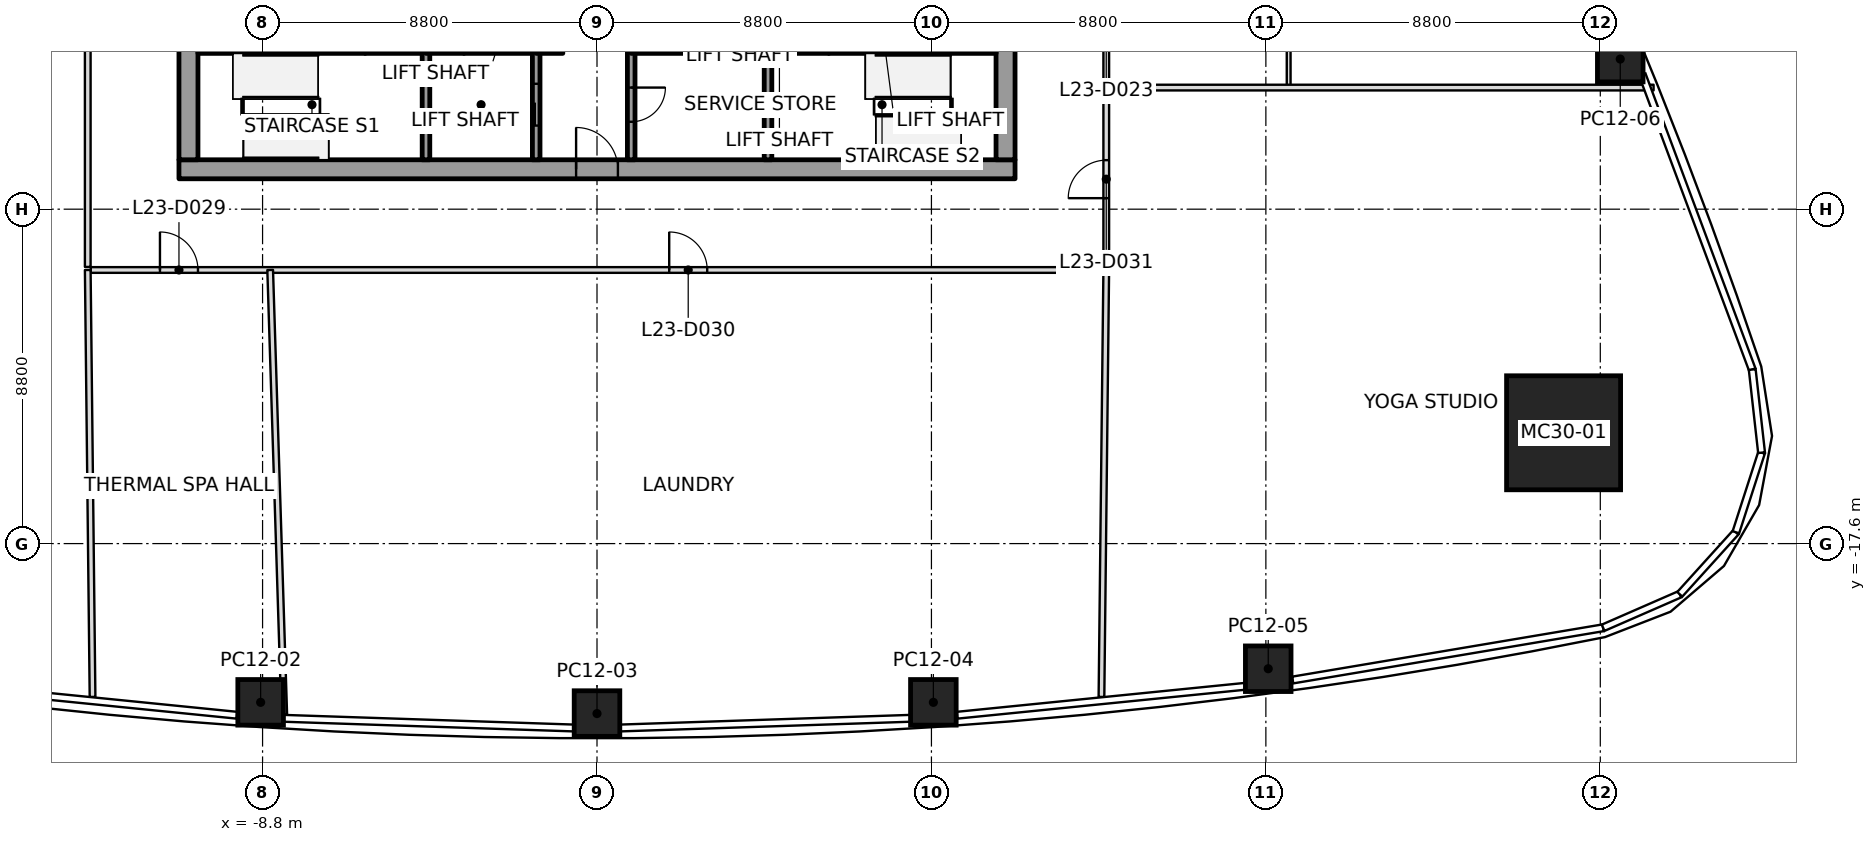
"""IFC4 building model, lengths in metres.
Left out: names, types, materials, properties, quantities, classifications, styles, units other than length and angle.
Written with IfcOpenShell. Run it as: python <this file> out.ifc"""

import sys

from ifc_helpers import new_model, si_unit, direction, frame, frame_2d, origin, origin_2d, place, context, subcontext, project, spatial, rectangle, extrude, clip, halfspace, element, fill, save


model = new_model("IFC4")
c1 = context("Model", 3, precision=1e-05, world=origin(), true_north=direction((0.0, 1.0)))
c2 = subcontext(c1, "Body", "Model", "MODEL_VIEW")
j1 = project(units=[si_unit("LENGTHUNIT", "METRE"), si_unit("PLANEANGLEUNIT", "RADIAN")], contexts=[c1])
p1 = place(None, origin())
s1 = spatial("IfcSite", under=j1, at=p1, CompositionType="ELEMENT")
p2 = place(p1, origin())
s2 = spatial("IfcBuilding", under=s1, at=p2, CompositionType="ELEMENT")
p3 = place(p2, frame((0.0, 0.0, 107.2)))
s3 = spatial("IfcBuildingStorey", under=s2, at=p3, CompositionType="ELEMENT", Elevation=107.2)
p4 = place(p3, frame((25.434, -14.684, 0.0), z_axis=(-0.020880956331, 0.012022368797, 0.999709682013), x_axis=(0.999781969063, 0.000251093304, 0.020879446579)))
e1 = element("IfcColumn", 1, at=p4, inside=s3, PredefinedType="COLUMN", context=c2, shape_type="SweptSolid", body=[
    clip(clip(extrude(rectangle(XDim=3.0, YDim=3.0, at=origin_2d()), origin(), (0.0, 0.0, 1.0), 5.402), halfspace(frame((0.0, 0.0, 0.012)), True)), halfspace(frame((0.0, 0.0, 5.399)), False)),
])
p5 = place(p3, frame((-8.851, -21.778, 0.0), z_axis=(0.00655508488, 0.008272969194, 0.99994429287), x_axis=(-0.997755324647, 0.066696663448, 0.005988925027)))
e2 = element("IfcColumn", 2, at=p5, inside=s3, PredefinedType="COLUMN", context=c2, shape_type="SweptSolid", body=[
    clip(clip(extrude(rectangle(XDim=1.2, YDim=1.2, at=origin_2d()), origin(), (0.0, 0.0, 1.0), 5.4), halfspace(frame((0.0, 0.0, 0.002)), True)), halfspace(frame((0.0, 0.0, 5.397)), False)),
])
p6 = place(p3, frame((0.0, -22.073, 0.0), z_axis=(0.0, 0.008499173095, 0.999963881376), x_axis=(1.0, 0.0, 0.0)))
e3 = element("IfcColumn", 3, at=p6, inside=s3, PredefinedType="COLUMN", context=c2, shape_type="SweptSolid", body=[
    clip(clip(extrude(rectangle(XDim=1.2, YDim=1.2, at=origin_2d()), origin(), (0.0, 0.0, 1.0), 5.4), halfspace(frame((0.0, 0.0, 0.001)), True)), halfspace(frame((0.0, 0.0, 5.397)), False)),
])
p7 = place(p3, frame((8.851, -21.778, 0.0), z_axis=(-0.00655508488, 0.008272969194, 0.99994429287), x_axis=(0.997755324647, 0.066696663448, 0.005988925027)))
e4 = element("IfcColumn", 4, at=p7, inside=s3, PredefinedType="COLUMN", context=c2, shape_type="SweptSolid", body=[
    clip(clip(extrude(rectangle(XDim=1.2, YDim=1.2, at=origin_2d()), origin(), (0.0, 0.0, 1.0), 5.4), halfspace(frame((0.0, 0.0, 0.002)), True)), halfspace(frame((0.0, 0.0, 5.397)), False)),
])
p8 = place(p3, frame((17.662, -20.893, 0.0), z_axis=(-0.013154574087, 0.007775212175, 0.999883244812), x_axis=(0.991031175757, 0.133090691637, 0.012003186093)))
e5 = element("IfcColumn", 5, at=p8, inside=s3, PredefinedType="COLUMN", context=c2, shape_type="SweptSolid", body=[
    clip(clip(extrude(rectangle(XDim=1.2, YDim=1.2, at=origin_2d()), origin(), (0.0, 0.0, 1.0), 5.401), halfspace(frame((0.0, 0.0, 0.003)), True)), halfspace(frame((0.0, 0.0, 5.397)), False)),
])
p9 = place(p3, frame((26.925, -4.849, 0.0), z_axis=(-0.01329019196, 0.007503985937, 0.999883523713), x_axis=(-0.380349266777, 0.924765125623, -0.011995736484)))
e6 = element("IfcColumn", 6, at=p9, inside=s3, PredefinedType="COLUMN", context=c2, shape_type="SweptSolid", body=[
    clip(clip(extrude(rectangle(XDim=1.2, YDim=1.2, at=origin_2d()), origin(), (0.0, 0.0, 1.0), 5.401), halfspace(frame((0.0, 0.0, 0.003)), True)), halfspace(frame((0.0, 0.0, 5.397)), False)),
])
p10 = place(p3, frame((-11.0, -7.75, 0.0), z_axis=(0.0, 0.0, 1.0), x_axis=(1.0, 0.0, 0.0)))
e7 = element("IfcWall", 7, at=p10, inside=s3, PredefinedType="SHEAR", context=c2, shape_type="SweptSolid", body=[
    extrude(rectangle(XDim=22.0, YDim=0.5, at=frame_2d((11.0, 0.0))), origin(), (0.0, 0.0, 1.0), 5.4),
])
p11 = place(p10, frame((10.45, 0.0, 0.0)))
e8 = element("IfcOpeningElement", 8, at=p11, cuts=e7, PredefinedType="OPENING", context=c2, shape_type="SweptSolid", body=[
    extrude(rectangle(XDim=1.1, YDim=2.1, at=frame_2d((0.55, 1.05))), frame((0.0, 0.25, 0.0), z_axis=(0.0, -1.0, 0.0), x_axis=(1.0, 0.0, 0.0)), (0.0, 0.0, 1.0), 0.5),
])
p12 = place(p3, frame((-10.75, -7.5, 0.0), z_axis=(0.0, 0.0, 1.0), x_axis=(0.0, 1.0, 0.0)))
e9 = element("IfcWall", 9, at=p12, inside=s3, PredefinedType="SHEAR", context=c2, shape_type="SweptSolid", body=[
    extrude(rectangle(XDim=15.0, YDim=0.5, at=frame_2d((7.5, 0.0))), origin(), (0.0, 0.0, 1.0), 5.4),
])
p13 = place(p12, frame((6.6, 0.0, 0.0)))
e10 = element("IfcOpeningElement", 10, at=p13, cuts=e9, PredefinedType="OPENING", context=c2, shape_type="SweptSolid", body=[
    extrude(rectangle(XDim=1.8, YDim=2.1, at=frame_2d((0.9, 1.05))), frame((0.0, 0.25, 0.0), z_axis=(0.0, -1.0, 0.0), x_axis=(1.0, 0.0, 0.0)), (0.0, 0.0, 1.0), 0.5),
])
p14 = place(p3, frame((10.75, -7.5, 0.0), z_axis=(0.0, 0.0, 1.0), x_axis=(0.0, 1.0, 0.0)))
e11 = element("IfcWall", 11, at=p14, inside=s3, PredefinedType="SHEAR", context=c2, shape_type="SweptSolid", body=[
    extrude(rectangle(XDim=15.0, YDim=0.5, at=frame_2d((7.5, 0.0))), origin(), (0.0, 0.0, 1.0), 5.4),
])
p15 = place(p14, frame((6.6, 0.0, 0.0)))
e12 = element("IfcOpeningElement", 12, at=p15, cuts=e11, PredefinedType="OPENING", context=c2, shape_type="SweptSolid", body=[
    extrude(rectangle(XDim=1.8, YDim=2.1, at=frame_2d((0.9, 1.05))), frame((0.0, 0.25, 0.0), z_axis=(0.0, -1.0, 0.0), x_axis=(1.0, 0.0, 0.0)), (0.0, 0.0, 1.0), 0.5),
])
p16 = place(p3, frame((-10.5, -4.6, 0.0), z_axis=(0.0, 0.0, 1.0), x_axis=(1.0, 0.0, 0.0)))
e13 = element("IfcWall", 13, at=p16, inside=s3, PredefinedType="SOLIDWALL", context=c2, shape_type="SweptSolid", body=[
    extrude(rectangle(XDim=1.8, YDim=0.2, at=frame_2d((0.9, 0.0))), origin(), (0.0, 0.0, 1.0), 5.25),
])
p17 = place(p16, frame((0.1, 0.0, 0.0)))
e14 = element("IfcOpeningElement", 14, at=p17, cuts=e13, PredefinedType="OPENING", context=c2, shape_type="SweptSolid", body=[
    extrude(rectangle(XDim=1.0, YDim=2.1, at=frame_2d((0.5, 1.05))), frame((0.0, 0.1, 0.0), z_axis=(0.0, -1.0, 0.0), x_axis=(1.0, 0.0, 0.0)), (0.0, 0.0, 1.0), 0.2),
])
p18 = place(p3, frame((-8.7, -4.6, 0.0), z_axis=(0.0, 0.0, 1.0), x_axis=(1.0, 0.0, 0.0)))
e15 = element("IfcWall", 15, at=p18, inside=s3, PredefinedType="SOLIDWALL", context=c2, shape_type="SweptSolid", body=[
    extrude(rectangle(XDim=2.6, YDim=0.2, at=frame_2d((1.3, 0.0))), origin(), (0.0, 0.0, 1.0), 5.25),
])
p19 = place(p3, frame((-6.1, -4.6, 0.0), z_axis=(0.0, 0.0, 1.0), x_axis=(1.0, 0.0, 0.0)))
e16 = element("IfcWall", 16, at=p19, inside=s3, PredefinedType="SOLIDWALL", context=c2, shape_type="SweptSolid", body=[
    extrude(rectangle(XDim=1.6, YDim=0.2, at=frame_2d((0.8, 0.0))), origin(), (0.0, 0.0, 1.0), 5.25),
])
p20 = place(p3, frame((-4.5, -4.6, 0.0), z_axis=(0.0, 0.0, 1.0), x_axis=(0.0, -1.0, 0.0)))
e17 = element("IfcWall", 17, at=p20, inside=s3, PredefinedType="SOLIDWALL", context=c2, shape_type="SweptSolid", body=[
    extrude(rectangle(XDim=2.9, YDim=0.2, at=frame_2d((1.45, 0.0))), origin(), (0.0, 0.0, 1.0), 5.25),
])
p21 = place(p3, frame((-4.5, -4.6, 0.0), z_axis=(0.0, 0.0, 1.0), x_axis=(1.0, 0.0, 0.0)))
e18 = element("IfcWall", 18, at=p21, inside=s3, PredefinedType="SOLIDWALL", context=c2, shape_type="SweptSolid", body=[
    extrude(rectangle(XDim=1.0, YDim=0.2, at=frame_2d((0.5, 0.0))), origin(), (0.0, 0.0, 1.0), 5.25),
])
p22 = place(p3, frame((-3.5, -4.6, 0.0), z_axis=(0.0, 0.0, 1.0), x_axis=(1.0, 0.0, 0.0)))
e19 = element("IfcWall", 19, at=p22, inside=s3, PredefinedType="SOLIDWALL", context=c2, shape_type="SweptSolid", body=[
    extrude(rectangle(XDim=1.9, YDim=0.2, at=frame_2d((0.95, 0.0))), origin(), (0.0, 0.0, 1.0), 5.25),
])
p23 = place(p3, frame((-1.6, -7.5, 0.0), z_axis=(0.0, 0.0, 1.0), x_axis=(0.0, 1.0, 0.0)))
e20 = element("IfcWall", 20, at=p23, inside=s3, PredefinedType="SOLIDWALL", context=c2, shape_type="SweptSolid", body=[
    extrude(rectangle(XDim=2.9, YDim=0.2, at=frame_2d((1.45, 0.0))), origin(), (0.0, 0.0, 1.0), 5.25),
])
p24 = place(p23, frame((0.9, 0.0, 0.0)))
e21 = element("IfcOpeningElement", 21, at=p24, cuts=e20, PredefinedType="OPENING", context=c2, shape_type="SweptSolid", body=[
    extrude(rectangle(XDim=1.1, YDim=2.1, at=frame_2d((0.55, 1.05))), frame((0.0, 0.1, 0.0), z_axis=(0.0, -1.0, 0.0), x_axis=(1.0, 0.0, 0.0)), (0.0, 0.0, 1.0), 0.2),
])
p25 = place(p3, frame((-1.6, -4.6, 0.0), z_axis=(0.0, 0.0, 1.0), x_axis=(1.0, 0.0, 0.0)))
e22 = element("IfcWall", 22, at=p25, inside=s3, PredefinedType="SOLIDWALL", context=c2, shape_type="SweptSolid", body=[
    extrude(rectangle(XDim=0.7, YDim=0.2, at=frame_2d((0.35, 0.0))), origin(), (0.0, 0.0, 1.0), 5.25),
])
p26 = place(p3, frame((0.9, -4.6, 0.0), z_axis=(0.0, 0.0, 1.0), x_axis=(0.0, -1.0, 0.0)))
e23 = element("IfcWall", 23, at=p26, inside=s3, PredefinedType="SOLIDWALL", context=c2, shape_type="SweptSolid", body=[
    extrude(rectangle(XDim=2.9, YDim=0.2, at=frame_2d((1.45, 0.0))), origin(), (0.0, 0.0, 1.0), 5.25),
])
p27 = place(p26, frame((1.0, 0.0, 0.0)))
e24 = element("IfcOpeningElement", 24, at=p27, cuts=e23, PredefinedType="OPENING", context=c2, shape_type="SweptSolid", body=[
    extrude(rectangle(XDim=0.9, YDim=2.1, at=frame_2d((0.45, 1.05))), frame((0.0, 0.1, 0.0), z_axis=(0.0, -1.0, 0.0), x_axis=(1.0, 0.0, 0.0)), (0.0, 0.0, 1.0), 0.2),
])
p28 = place(p3, frame((3.5, -4.6, 0.0), z_axis=(0.0, 0.0, 1.0), x_axis=(-1.0, 0.0, 0.0)))
e25 = element("IfcWall", 25, at=p28, inside=s3, PredefinedType="SOLIDWALL", context=c2, shape_type="SweptSolid", body=[
    extrude(rectangle(XDim=2.6, YDim=0.2, at=frame_2d((1.3, 0.0))), origin(), (0.0, 0.0, 1.0), 5.25),
])
p29 = place(p3, frame((4.5, -4.6, 0.0), z_axis=(0.0, 0.0, 1.0), x_axis=(-1.0, 0.0, 0.0)))
e26 = element("IfcWall", 26, at=p29, inside=s3, PredefinedType="SOLIDWALL", context=c2, shape_type="SweptSolid", body=[
    extrude(rectangle(XDim=1.0, YDim=0.2, at=frame_2d((0.5, 0.0))), origin(), (0.0, 0.0, 1.0), 5.25),
])
p30 = place(p3, frame((4.5, -7.5, 0.0), z_axis=(0.0, 0.0, 1.0), x_axis=(0.0, 1.0, 0.0)))
e27 = element("IfcWall", 27, at=p30, inside=s3, PredefinedType="SOLIDWALL", context=c2, shape_type="SweptSolid", body=[
    extrude(rectangle(XDim=2.9, YDim=0.2, at=frame_2d((1.45, 0.0))), origin(), (0.0, 0.0, 1.0), 5.25),
])
p31 = place(p3, frame((4.5, -4.6, 0.0), z_axis=(0.0, 0.0, 1.0), x_axis=(1.0, 0.0, 0.0)))
e28 = element("IfcWall", 28, at=p31, inside=s3, PredefinedType="SOLIDWALL", context=c2, shape_type="SweptSolid", body=[
    extrude(rectangle(XDim=1.6, YDim=0.2, at=frame_2d((0.8, 0.0))), origin(), (0.0, 0.0, 1.0), 5.25),
])
p32 = place(p3, frame((6.1, -4.6, 0.0), z_axis=(0.0, 0.0, 1.0), x_axis=(1.0, 0.0, 0.0)))
e29 = element("IfcWall", 29, at=p32, inside=s3, PredefinedType="SOLIDWALL", context=c2, shape_type="SweptSolid", body=[
    extrude(rectangle(XDim=2.6, YDim=0.2, at=frame_2d((1.3, 0.0))), origin(), (0.0, 0.0, 1.0), 5.25),
])
p33 = place(p3, frame((8.7, -4.6, 0.0), z_axis=(0.0, 0.0, 1.0), x_axis=(1.0, 0.0, 0.0)))
e30 = element("IfcWall", 30, at=p33, inside=s3, PredefinedType="SOLIDWALL", context=c2, shape_type="SweptSolid", body=[
    extrude(rectangle(XDim=1.8, YDim=0.2, at=frame_2d((0.9, 0.0))), origin(), (0.0, 0.0, 1.0), 5.25),
])
p34 = place(p33, frame((0.7, 0.0, 0.0)))
e31 = element("IfcOpeningElement", 31, at=p34, cuts=e30, PredefinedType="OPENING", context=c2, shape_type="SweptSolid", body=[
    extrude(rectangle(XDim=1.0, YDim=2.1, at=frame_2d((0.5, 1.05))), frame((0.0, 0.1, 0.0), z_axis=(0.0, -1.0, 0.0), x_axis=(1.0, 0.0, 0.0)), (0.0, 0.0, 1.0), 0.2),
])
p35 = place(p3, frame((-13.4, -10.4, 0.0), z_axis=(0.0, 0.0, 1.0), x_axis=(0.011211567949, -0.999937148397, 0.0)))
e32 = element("IfcWall", 32, at=p35, inside=s3, PredefinedType="PARTITIONING", context=c2, shape_type="SweptSolid", body=[
    extrude(rectangle(XDim=11.236, YDim=0.15, at=frame_2d((5.618, 0.0))), origin(), (0.0, 0.0, 1.0), 4.534),
])
p36 = place(p3, frame((-8.6, -10.4, 0.0), z_axis=(0.0, 0.0, 1.0), x_axis=(0.031622218361, -0.999499892599, 0.0)))
e33 = element("IfcWall", 33, at=p36, inside=s3, PredefinedType="PARTITIONING", context=c2, shape_type="SweptSolid", body=[
    extrude(rectangle(XDim=11.704, YDim=0.15, at=frame_2d((5.852, 0.0))), origin(), (0.0, 0.0, 1.0), 4.534),
])
p37 = place(p3, frame((13.4, -10.4, 0.0), z_axis=(0.0, 0.0, 1.0), x_axis=(-0.011211567949, -0.999937148397, 0.0)))
e34 = element("IfcWall", 34, at=p37, inside=s3, PredefinedType="PARTITIONING", context=c2, shape_type="SweptSolid", body=[
    extrude(rectangle(XDim=11.236, YDim=0.15, at=frame_2d((5.618, 0.0))), origin(), (0.0, 0.0, 1.0), 4.534),
])
p38 = place(p3, frame((27.802, -5.6, 0.0), z_axis=(0.0, 0.0, 1.0), x_axis=(-1.0, 0.0, 0.0)))
e35 = element("IfcWall", 35, at=p38, inside=s3, PredefinedType="PARTITIONING", context=c2, shape_type="SweptSolid", body=[
    extrude(rectangle(XDim=14.402, YDim=0.15, at=frame_2d((7.201, 0.0))), origin(), (0.0, 0.0, 1.0), 4.534),
])
p39 = place(p3, frame((-13.4, 10.32, 0.0), z_axis=(0.0, 0.0, 1.0), x_axis=(0.0, -1.0, 0.0)))
e36 = element("IfcWall", 36, at=p39, inside=s3, PredefinedType="PARTITIONING", context=c2, shape_type="SweptSolid", body=[
    extrude(rectangle(XDim=20.64, YDim=0.15, at=frame_2d((10.32, 0.0))), origin(), (0.0, 0.0, 1.0), 4.397),
])
p40 = place(p39, frame((9.83, 0.0, 0.0)))
e37 = element("IfcOpeningElement", 37, at=p40, cuts=e36, PredefinedType="OPENING", context=c2, shape_type="SweptSolid", body=[
    extrude(rectangle(XDim=1.0, YDim=2.1, at=frame_2d((0.5, 1.05))), frame((0.0, 0.075, 0.0), z_axis=(0.0, -1.0, 0.0), x_axis=(1.0, 0.0, 0.0)), (0.0, 0.0, 1.0), 0.15),
])
p41 = place(p3, frame((-13.32, -10.4, 0.0), z_axis=(0.0, 0.0, 1.0), x_axis=(1.0, 0.0, 0.0)))
e38 = element("IfcWall", 38, at=p41, inside=s3, PredefinedType="PARTITIONING", context=c2, shape_type="SweptSolid", body=[
    extrude(rectangle(XDim=26.64, YDim=0.15, at=frame_2d((13.32, 0.0))), origin(), (0.0, 0.0, 1.0), 4.538),
])
p42 = place(p41, frame((1.82, 0.0, 0.0)))
e39 = element("IfcOpeningElement", 39, at=p42, cuts=e38, PredefinedType="OPENING", context=c2, shape_type="SweptSolid", body=[
    extrude(rectangle(XDim=1.0, YDim=2.1, at=frame_2d((0.5, 1.05))), frame((0.0, 0.075, 0.0), z_axis=(0.0, -1.0, 0.0), x_axis=(1.0, 0.0, 0.0)), (0.0, 0.0, 1.0), 0.15),
])
p43 = place(p41, frame((15.22, 0.0, 0.0)))
e40 = element("IfcOpeningElement", 40, at=p43, cuts=e38, PredefinedType="OPENING", context=c2, shape_type="SweptSolid", body=[
    extrude(rectangle(XDim=1.0, YDim=2.1, at=frame_2d((0.5, 1.05))), frame((0.0, 0.075, 0.0), z_axis=(0.0, -1.0, 0.0), x_axis=(1.0, 0.0, 0.0)), (0.0, 0.0, 1.0), 0.15),
])
p44 = place(p3, frame((13.4, -10.32, 0.0), z_axis=(0.0, 0.0, 1.0), x_axis=(0.0, 1.0, 0.0)))
e41 = element("IfcWall", 41, at=p44, inside=s3, PredefinedType="PARTITIONING", context=c2, shape_type="SweptSolid", body=[
    extrude(rectangle(XDim=20.64, YDim=0.15, at=frame_2d((10.32, 0.0))), origin(), (0.0, 0.0, 1.0), 4.397),
])
p45 = place(p44, frame((6.32, 0.0, 0.0)))
e42 = element("IfcOpeningElement", 42, at=p45, cuts=e41, PredefinedType="OPENING", context=c2, shape_type="SweptSolid", body=[
    extrude(rectangle(XDim=1.0, YDim=2.1, at=frame_2d((0.5, 1.05))), frame((0.0, 0.075, 0.0), z_axis=(0.0, -1.0, 0.0), x_axis=(1.0, 0.0, 0.0)), (0.0, 0.0, 1.0), 0.15),
])
p46 = place(p44, frame((13.97, 0.0, 0.0)))
e43 = element("IfcOpeningElement", 43, at=p46, cuts=e41, PredefinedType="OPENING", context=c2, shape_type="SweptSolid", body=[
    extrude(rectangle(XDim=1.8, YDim=2.1, at=frame_2d((0.9, 1.05))), frame((0.0, 0.075, 0.0), z_axis=(0.0, -1.0, 0.0), x_axis=(1.0, 0.0, 0.0)), (0.0, 0.0, 1.0), 0.15),
])
p47 = place(p44, frame((1.81, 0.0, 0.0)))
e44 = element("IfcOpeningElement", 44, at=p47, cuts=e41, PredefinedType="OPENING", context=c2, shape_type="SweptSolid", body=[
    extrude(rectangle(XDim=1.0, YDim=2.1, at=frame_2d((0.5, 1.05))), frame((0.0, 0.075, 0.0), z_axis=(0.0, -1.0, 0.0), x_axis=(1.0, 0.0, 0.0)), (0.0, 0.0, 1.0), 0.15),
])
p48 = place(p3, frame((18.2, -1.4, 0.0), z_axis=(0.0, 0.0, 1.0), x_axis=(0.0, -1.0, 0.0)))
e45 = element("IfcWall", 45, at=p48, inside=s3, PredefinedType="PARTITIONING", context=c2, shape_type="SweptSolid", body=[
    extrude(rectangle(XDim=4.17, YDim=0.1, at=frame_2d((2.085, 0.0))), origin(), (0.0, 0.0, 1.0), 4.538),
])
p49 = place(p42, origin())
e46 = element("IfcDoor", 46, at=p49, inside=s3, OperationType="SINGLE_SWING_LEFT", PredefinedType="DOOR", context=c2, shape_type="SweptSolid", body=[
    extrude(rectangle(XDim=1.0, YDim=2.1, at=frame_2d((0.5, 1.05))), frame((0.0, 0.025, 0.0), z_axis=(0.0, -1.0, 0.0), x_axis=(1.0, 0.0, 0.0)), (0.0, 0.0, 1.0), 0.05),
])
fill(e39, e46)
p50 = place(p43, origin())
e47 = element("IfcDoor", 47, at=p50, inside=s3, OperationType="SINGLE_SWING_RIGHT", PredefinedType="DOOR", context=c2, shape_type="SweptSolid", body=[
    extrude(rectangle(XDim=1.0, YDim=2.1, at=frame_2d((0.5, 1.05))), frame((0.0, 0.025, 0.0), z_axis=(0.0, -1.0, 0.0), x_axis=(1.0, 0.0, 0.0)), (0.0, 0.0, 1.0), 0.05),
])
fill(e40, e47)
p51 = place(p47, origin())
e48 = element("IfcDoor", 48, at=p51, inside=s3, OperationType="SINGLE_SWING_RIGHT", PredefinedType="DOOR", context=c2, shape_type="SweptSolid", body=[
    extrude(rectangle(XDim=1.0, YDim=2.1, at=frame_2d((0.5, 1.05))), frame((0.0, 0.025, 0.0), z_axis=(0.0, -1.0, 0.0), x_axis=(1.0, 0.0, 0.0)), (0.0, 0.0, 1.0), 0.05),
])
fill(e44, e48)
p52 = place(p24, origin())
e49 = element("IfcDoor", 49, at=p52, inside=s3, OperationType="SLIDING_TO_RIGHT", PredefinedType="DOOR", context=c2, shape_type="SweptSolid", body=[
    extrude(rectangle(XDim=1.1, YDim=2.1, at=frame_2d((0.55, 1.05))), frame((0.0, 0.025, 0.0), z_axis=(0.0, -1.0, 0.0), x_axis=(1.0, 0.0, 0.0)), (0.0, 0.0, 1.0), 0.05),
])
fill(e21, e49)
p53 = place(p27, origin())
e50 = element("IfcDoor", 50, at=p53, inside=s3, OperationType="SINGLE_SWING_LEFT", PredefinedType="DOOR", context=c2, shape_type="SweptSolid", body=[
    extrude(rectangle(XDim=0.9, YDim=2.1, at=frame_2d((0.45, 1.05))), frame((0.0, 0.025, 0.0), z_axis=(0.0, -1.0, 0.0), x_axis=(1.0, 0.0, 0.0)), (0.0, 0.0, 1.0), 0.05),
])
fill(e24, e50)
p54 = place(p11, origin())
e51 = element("IfcDoor", 51, at=p54, inside=s3, OperationType="SINGLE_SWING_RIGHT", PredefinedType="DOOR", context=c2, shape_type="SweptSolid", body=[
    extrude(rectangle(XDim=1.1, YDim=2.1, at=frame_2d((0.55, 1.05))), frame((0.0, 0.025, 0.0), z_axis=(0.0, -1.0, 0.0), x_axis=(1.0, 0.0, 0.0)), (0.0, 0.0, 1.0), 0.05),
])
fill(e8, e51)
save(model, sys.argv[1])
